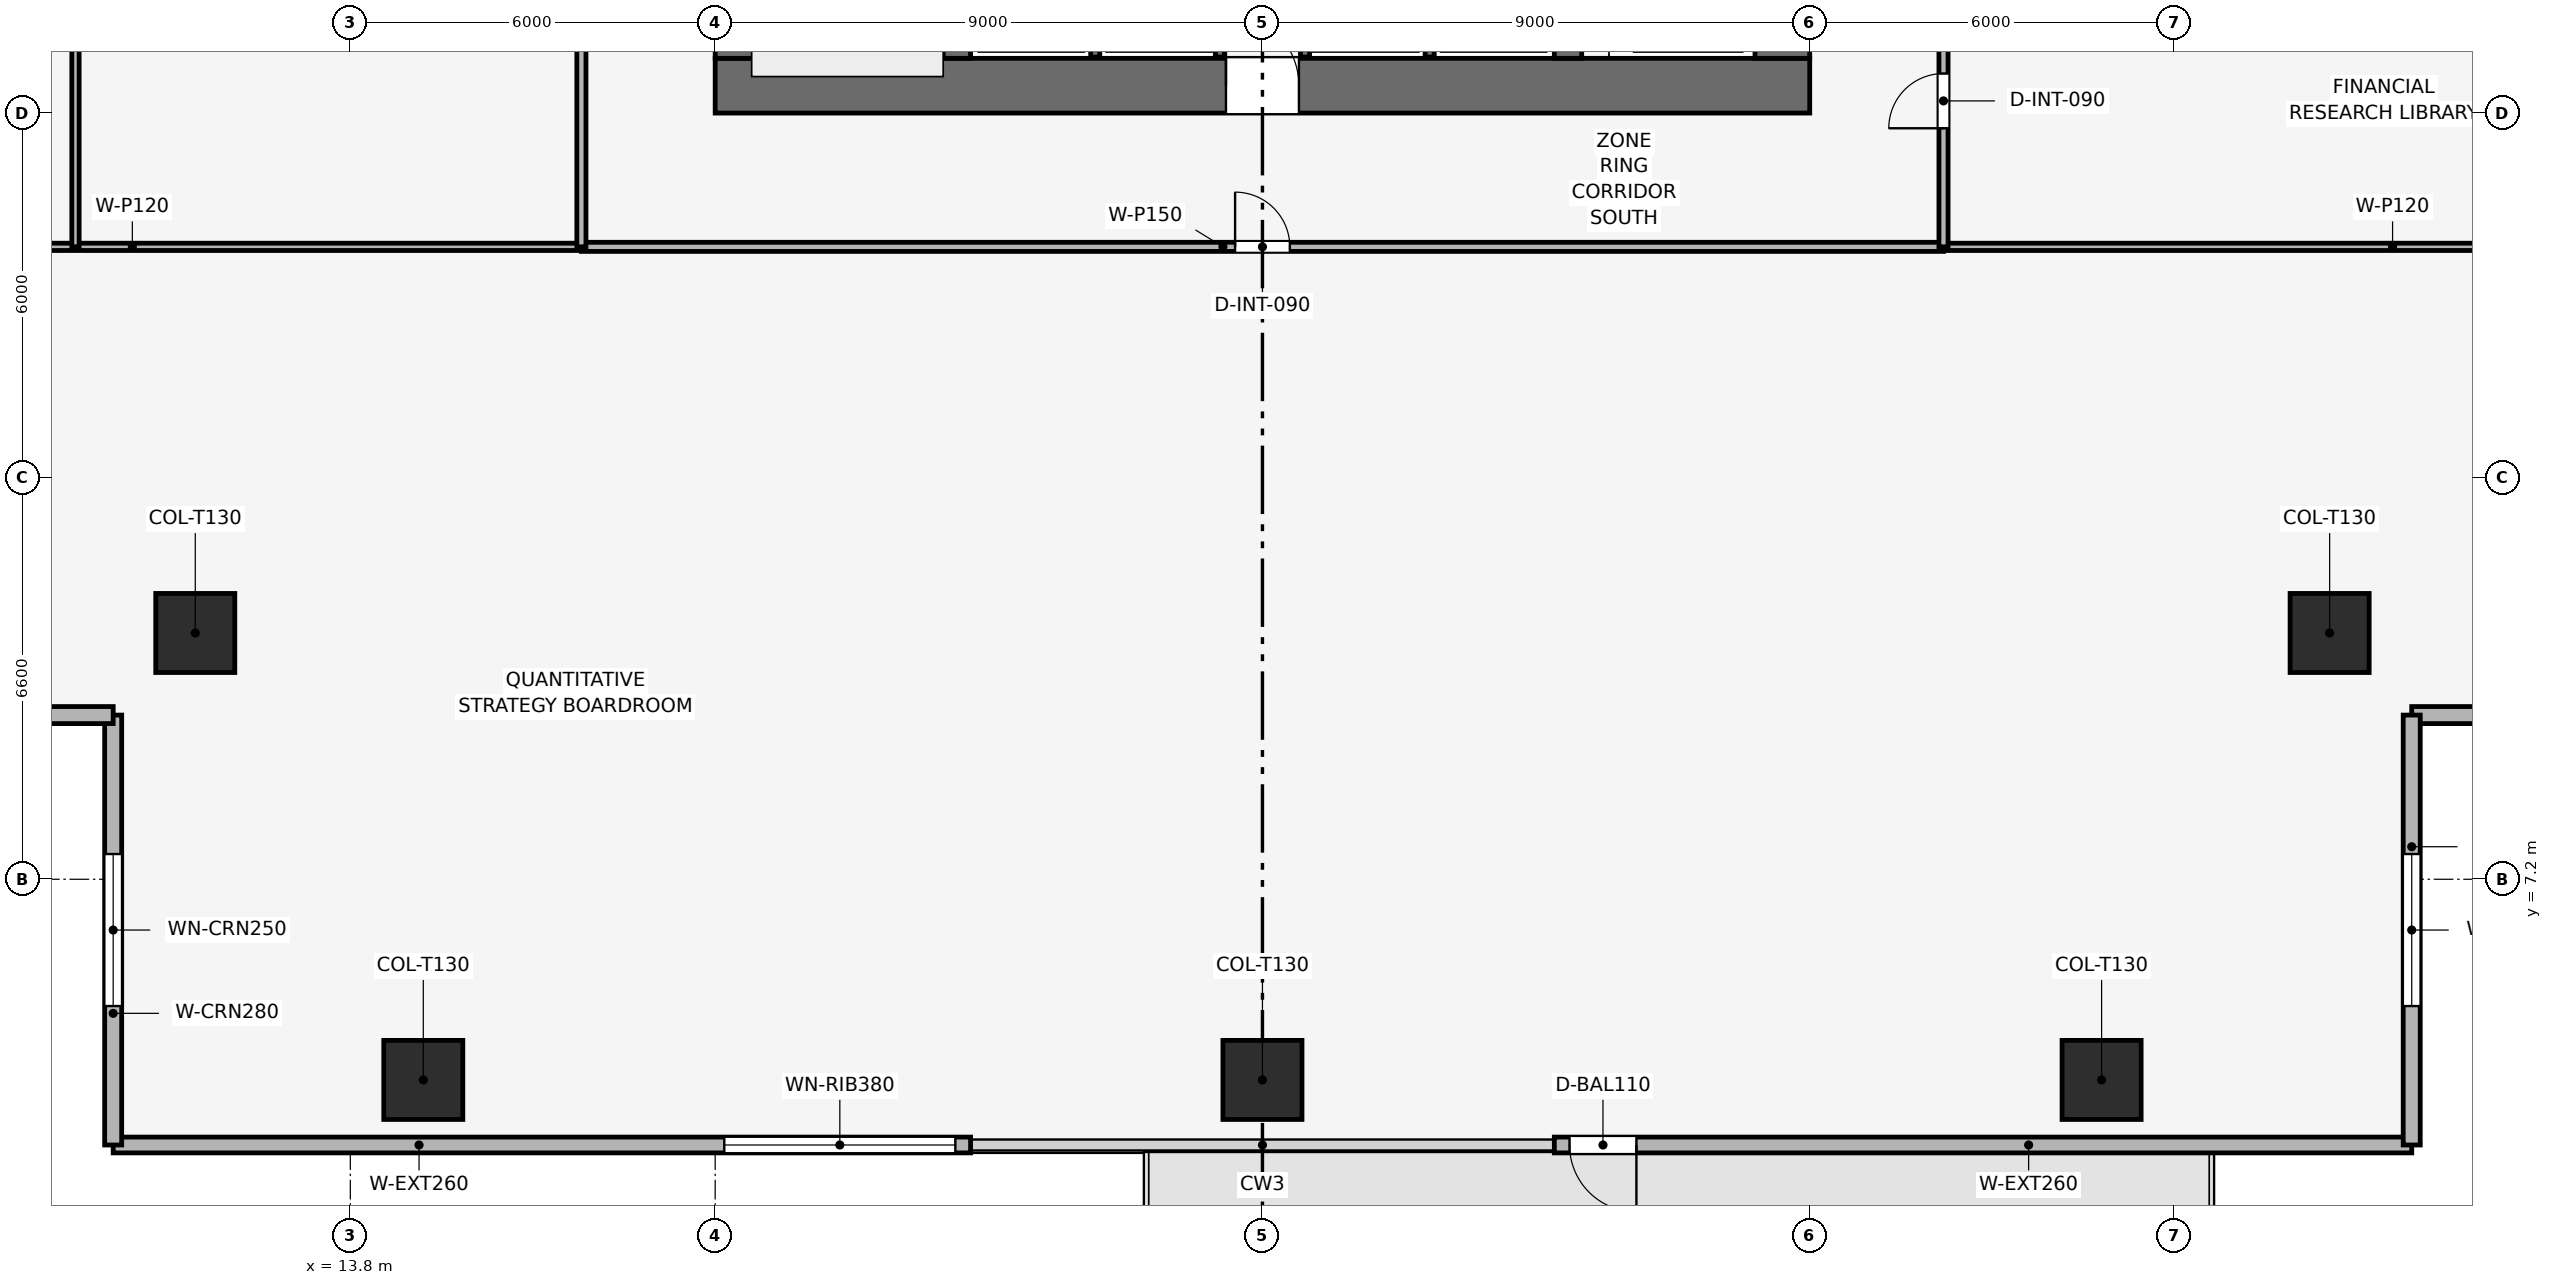
"""IFC4 building model, lengths in metres.
Left out: names, types, materials, properties, quantities, classifications, styles, units other than length and angle.
Written with IfcOpenShell. Run it as: python <this file> out.ifc"""

import sys

from ifc_helpers import new_model, si_unit, direction, frame, frame_2d, origin, origin_2d, place, context, subcontext, project, spatial, rectangle, extrude, element, fill, save


model = new_model("IFC4")
c1 = context("Model", 3, precision=1e-05, world=origin(), true_north=direction((0.0, 1.0)))
c2 = subcontext(c1, "Body", "Model", "MODEL_VIEW")
j1 = project(units=[si_unit("LENGTHUNIT", "METRE"), si_unit("PLANEANGLEUNIT", "RADIAN")], contexts=[c1])
p1 = place(None, origin())
s1 = spatial("IfcSite", under=j1, at=p1, CompositionType="ELEMENT")
p2 = place(p1, origin())
s2 = spatial("IfcBuilding", under=s1, at=p2, CompositionType="ELEMENT")
p3 = place(p2, frame((0.0, 0.0, 117.3)))
s3 = spatial("IfcBuildingStorey", under=s2, at=p3, CompositionType="ELEMENT", Elevation=117.3)
p4 = place(p3, frame((19.8, 20.25, 0.0), z_axis=(0.0, 0.0, 1.0), x_axis=(1.0, 0.0, 0.0)))
e1 = element("IfcWall", 1, at=p4, inside=s3, PredefinedType="SHEAR", context=c2, shape_type="SweptSolid", body=[
    extrude(rectangle(XDim=18.0, YDim=0.9, at=frame_2d((9.0, 0.0))), origin(), (0.0, 0.0, 1.0), 3.9),
])
p5 = place(p4, frame((8.4, 0.0, 0.0)))
e2 = element("IfcOpeningElement", 2, at=p5, cuts=e1, PredefinedType="OPENING", context=c2, shape_type="SweptSolid", body=[
    extrude(rectangle(XDim=1.2, YDim=2.2, at=frame_2d((0.6, 1.1))), frame((0.0, 0.46, 0.0), z_axis=(0.0, -1.0, 0.0), x_axis=(1.0, 0.0, 0.0)), (0.0, 0.0, 1.0), 0.92),
])
p6 = place(p3, frame((20.25, 20.7, 0.0), z_axis=(0.0, 0.0, 1.0), x_axis=(0.0, 1.0, 0.0)))
e3 = element("IfcWall", 3, at=p6, inside=s3, PredefinedType="SHEAR", context=c2, shape_type="SweptSolid", body=[
    extrude(rectangle(XDim=16.2, YDim=0.9, at=frame_2d((8.1, 0.0))), origin(), (0.0, 0.0, 1.0), 3.9),
])
p7 = place(p6, frame((10.1, 0.0, 0.0)))
e4 = element("IfcOpeningElement", 4, at=p7, cuts=e3, PredefinedType="OPENING", context=c2, shape_type="SweptSolid", body=[
    extrude(rectangle(XDim=1.1, YDim=2.15, at=frame_2d((0.55, 1.075))), frame((0.0, 0.46, 0.0), z_axis=(0.0, -1.0, 0.0), x_axis=(1.0, 0.0, 0.0)), (0.0, 0.0, 1.0), 0.92),
])
p8 = place(p3, frame((37.35, 20.7, 0.0), z_axis=(0.0, 0.0, 1.0), x_axis=(0.0, 1.0, 0.0)))
e5 = element("IfcWall", 5, at=p8, inside=s3, PredefinedType="SHEAR", context=c2, shape_type="SweptSolid", body=[
    extrude(rectangle(XDim=16.2, YDim=0.9, at=frame_2d((8.1, 0.0))), origin(), (0.0, 0.0, 1.0), 3.9),
])
p9 = place(p8, frame((4.6, 0.0, 0.0)))
e6 = element("IfcOpeningElement", 6, at=p9, cuts=e5, PredefinedType="OPENING", context=c2, shape_type="SweptSolid", body=[
    extrude(rectangle(XDim=1.1, YDim=2.15, at=frame_2d((0.55, 1.075))), frame((0.0, 0.46, 0.0), z_axis=(0.0, -1.0, 0.0), x_axis=(1.0, 0.0, 0.0)), (0.0, 0.0, 1.0), 0.92),
])
for number, where, z_axis, x_axis in (
    (7, (23.775, 20.7, 0.0), (0.0, 0.0, 1.0), (0.0, 1.0, 0.0)),
    (8, (33.825, 20.7, 0.0), (0.0, 0.0, 1.0), (0.0, 1.0, 0.0)),
):
    element("IfcWall", number, at=place(p3, frame(where, z_axis=z_axis, x_axis=x_axis)), inside=s3, PredefinedType="SHEAR", context=c2, shape_type="SweptSolid", body=[
        extrude(rectangle(XDim=16.2, YDim=0.45, at=frame_2d((8.1, 0.0))), origin(), (0.0, 0.0, 1.0), 3.9),
    ])
for number, where, z_axis, x_axis in (
    (9, (15.0, 3.9, 0.003), (0.0, 0.0, 1.0), (1.0, 0.0, 0.0)),
    (10, (28.8, 3.9, 0.003), (0.0, 0.0, 1.0), (1.0, 0.0, 0.0)),
    (11, (42.6, 3.9, 0.003), (0.0, 0.0, 1.0), (1.0, 0.0, 0.0)),
    (12, (11.25, 11.25, 0.003), (0.0, 0.0, 1.0), (1.0, 0.0, 0.0)),
    (13, (46.35, 11.25, 0.003), (0.0, 0.0, 1.0), (1.0, 0.0, 0.0)),
):
    element("IfcColumn", number, at=place(p3, frame(where, z_axis=z_axis, x_axis=x_axis)), inside=s3, PredefinedType="COLUMN", context=c2, shape_type="SweptSolid", body=[
        extrude(rectangle(XDim=1.3, YDim=1.3, at=origin_2d()), origin(), (0.0, 0.0, 1.0), 3.644),
    ])
p10 = place(p3, frame((47.7, 2.83, 0.0), z_axis=(0.0, 0.0, 1.0), x_axis=(-1.0, 0.0, 0.0)))
e14 = element("IfcWall", 14, at=p10, inside=s3, PredefinedType="SOLIDWALL", context=c2, shape_type="SweptSolid", body=[
    extrude(rectangle(XDim=14.1, YDim=0.26, at=frame_2d((7.05, 0.0))), origin(), (0.0, 0.0, 1.0), 3.65),
])
p11 = place(p10, frame((12.75, 0.0, 0.0)))
e15 = element("IfcOpeningElement", 15, at=p11, cuts=e14, PredefinedType="OPENING", context=c2, shape_type="SweptSolid", body=[
    extrude(rectangle(XDim=1.1, YDim=2.2, at=frame_2d((0.55, 1.1))), frame((0.0, 0.14, 0.0), z_axis=(0.0, -1.0, 0.0), x_axis=(1.0, 0.0, 0.0)), (0.0, 0.0, 1.0), 0.28),
])
p12 = place(p3, frame((24.0, 2.83, 0.0), z_axis=(0.0, 0.0, 1.0), x_axis=(-1.0, 0.0, 0.0)))
e16 = element("IfcWall", 16, at=p12, inside=s3, PredefinedType="SOLIDWALL", context=c2, shape_type="SweptSolid", body=[
    extrude(rectangle(XDim=14.1, YDim=0.26, at=frame_2d((7.05, 0.0))), origin(), (0.0, 0.0, 1.0), 3.65),
])
p13 = place(p12, frame((0.25, 0.0, 0.9)))
e17 = element("IfcOpeningElement", 17, at=p13, cuts=e16, PredefinedType="OPENING", context=c2, shape_type="SweptSolid", body=[
    extrude(rectangle(XDim=3.8, YDim=1.9, at=frame_2d((1.9, 0.95))), frame((0.0, 0.14, 0.0), z_axis=(0.0, -1.0, 0.0), x_axis=(1.0, 0.0, 0.0)), (0.0, 0.0, 1.0), 0.28),
])
p14 = place(p3, frame((9.9, 2.83, 0.0), z_axis=(0.0, 0.0, 1.0), x_axis=(0.0, 1.0, 0.0)))
e18 = element("IfcWall", 18, at=p14, inside=s3, PredefinedType="SOLIDWALL", context=c2, shape_type="SweptSolid", body=[
    extrude(rectangle(XDim=7.07, YDim=0.28, at=frame_2d((3.535, 0.0))), origin(), (0.0, 0.0, 1.0), 3.65),
])
p15 = place(p14, frame((2.285, 0.0, 0.9)))
e19 = element("IfcOpeningElement", 19, at=p15, cuts=e18, PredefinedType="OPENING", context=c2, shape_type="SweptSolid", body=[
    extrude(rectangle(XDim=2.5, YDim=1.9, at=frame_2d((1.25, 0.95))), frame((0.0, 0.15, 0.0), z_axis=(0.0, -1.0, 0.0), x_axis=(1.0, 0.0, 0.0)), (0.0, 0.0, 1.0), 0.3),
])
p16 = place(p3, frame((9.9, 9.9, 0.0), z_axis=(0.0, 0.0, 1.0), x_axis=(-1.0, 0.0, 0.0)))
e20 = element("IfcWall", 20, at=p16, inside=s3, PredefinedType="SOLIDWALL", context=c2, shape_type="SweptSolid", body=[
    extrude(rectangle(XDim=7.07, YDim=0.28, at=frame_2d((3.535, 0.0))), origin(), (0.0, 0.0, 1.0), 3.65),
])
p17 = place(p16, frame((2.285, 0.0, 0.9)))
e21 = element("IfcOpeningElement", 21, at=p17, cuts=e20, PredefinedType="OPENING", context=c2, shape_type="SweptSolid", body=[
    extrude(rectangle(XDim=2.5, YDim=1.9, at=frame_2d((1.25, 0.95))), frame((0.0, 0.15, 0.0), z_axis=(0.0, -1.0, 0.0), x_axis=(1.0, 0.0, 0.0)), (0.0, 0.0, 1.0), 0.3),
])
p18 = place(p3, frame((54.77, 9.9, 0.0), z_axis=(0.0, 0.0, 1.0), x_axis=(-1.0, 0.0, 0.0)))
e22 = element("IfcWall", 22, at=p18, inside=s3, PredefinedType="SOLIDWALL", context=c2, shape_type="SweptSolid", body=[
    extrude(rectangle(XDim=7.07, YDim=0.28, at=frame_2d((3.535, 0.0))), origin(), (0.0, 0.0, 1.0), 3.65),
])
p19 = place(p18, frame((2.285, 0.0, 0.9)))
e23 = element("IfcOpeningElement", 23, at=p19, cuts=e22, PredefinedType="OPENING", context=c2, shape_type="SweptSolid", body=[
    extrude(rectangle(XDim=2.5, YDim=1.9, at=frame_2d((1.25, 0.95))), frame((0.0, 0.15, 0.0), z_axis=(0.0, -1.0, 0.0), x_axis=(1.0, 0.0, 0.0)), (0.0, 0.0, 1.0), 0.3),
])
p20 = place(p3, frame((47.7, 9.9, 0.0), z_axis=(0.0, 0.0, 1.0), x_axis=(0.0, -1.0, 0.0)))
e24 = element("IfcWall", 24, at=p20, inside=s3, PredefinedType="SOLIDWALL", context=c2, shape_type="SweptSolid", body=[
    extrude(rectangle(XDim=7.07, YDim=0.28, at=frame_2d((3.535, 0.0))), origin(), (0.0, 0.0, 1.0), 3.65),
])
p21 = place(p20, frame((2.285, 0.0, 0.9)))
e25 = element("IfcOpeningElement", 25, at=p21, cuts=e24, PredefinedType="OPENING", context=c2, shape_type="SweptSolid", body=[
    extrude(rectangle(XDim=2.5, YDim=1.9, at=frame_2d((1.25, 0.95))), frame((0.0, 0.15, 0.0), z_axis=(0.0, -1.0, 0.0), x_axis=(1.0, 0.0, 0.0)), (0.0, 0.0, 1.0), 0.3),
])
for number, where, z_axis, x_axis in (
    (26, (26.05, 20.72, 0.0), (0.0, 0.0, 1.0), (0.0, 1.0, 0.0)),
    (27, (28.1, 20.72, 0.0), (0.0, 0.0, 1.0), (0.0, 1.0, 0.0)),
    (28, (29.5, 20.72, 0.0), (0.0, 0.0, 1.0), (0.0, 1.0, 0.0)),
    (29, (31.55, 20.72, 0.0), (0.0, 0.0, 1.0), (0.0, 1.0, 0.0)),
):
    element("IfcWall", number, at=place(p3, frame(where, z_axis=z_axis, x_axis=x_axis)), inside=s3, PredefinedType="SHEAR", context=c2, shape_type="SweptSolid", body=[
        extrude(rectangle(XDim=2.26, YDim=0.15, at=frame_2d((1.13, 0.0))), origin(), (0.0, 0.0, 1.0), 3.65),
    ])
for number, where, z_axis, x_axis in (
    (30, (2.83, 17.6, 0.0), (0.0, 0.0, 1.0), (1.0, 0.0, 0.0)),
    (31, (40.0, 17.6, 0.0), (0.0, 0.0, 1.0), (1.0, 0.0, 0.0)),
):
    element("IfcWall", number, at=place(p3, frame(where, z_axis=z_axis, x_axis=x_axis)), inside=s3, PredefinedType="PARTITIONING", context=c2, shape_type="SweptSolid", body=[
        extrude(rectangle(XDim=14.77, YDim=0.12, at=frame_2d((7.385, 0.0))), origin(), (0.0, 0.0, 1.0), 3.035),
    ])
p22 = place(p3, frame((9.28, 17.6, 0.0), z_axis=(0.0, 0.0, 1.0), x_axis=(0.0, 1.0, 0.0)))
e32 = element("IfcWall", 32, at=p22, inside=s3, PredefinedType="PARTITIONING", context=c2, shape_type="SweptSolid", body=[
    extrude(rectangle(XDim=22.4, YDim=0.12, at=frame_2d((11.2, 0.0))), origin(), (0.0, 0.0, 1.0), 3.185),
])
p23 = place(p22, frame((17.783, 0.0, 0.0)))
e33 = element("IfcOpeningElement", 33, at=p23, cuts=e32, PredefinedType="OPENING", context=c2, shape_type="SweptSolid", body=[
    extrude(rectangle(XDim=0.9, YDim=2.1, at=frame_2d((0.45, 1.05))), frame((0.0, 0.07, 0.0), z_axis=(0.0, -1.0, 0.0), x_axis=(1.0, 0.0, 0.0)), (0.0, 0.0, 1.0), 0.14),
])
p24 = place(p3, frame((17.6, 17.6, 0.0), z_axis=(0.0, 0.0, 1.0), x_axis=(1.0, 0.0, 0.0)))
e34 = element("IfcWall", 34, at=p24, inside=s3, PredefinedType="PARTITIONING", context=c2, shape_type="SweptSolid", body=[
    extrude(rectangle(XDim=22.4, YDim=0.15, at=frame_2d((11.2, 0.0))), origin(), (0.0, 0.0, 1.0), 3.185),
])
p25 = place(p24, frame((10.75, 0.0, 0.0)))
e35 = element("IfcOpeningElement", 35, at=p25, cuts=e34, PredefinedType="OPENING", context=c2, shape_type="SweptSolid", body=[
    extrude(rectangle(XDim=0.9, YDim=2.1, at=frame_2d((0.45, 1.05))), frame((0.0, 0.085, 0.0), z_axis=(0.0, -1.0, 0.0), x_axis=(1.0, 0.0, 0.0)), (0.0, 0.0, 1.0), 0.17),
])
p26 = place(p3, frame((17.6, 17.6, 0.0), z_axis=(0.0, 0.0, 1.0), x_axis=(0.0, 1.0, 0.0)))
e36 = element("IfcWall", 36, at=p26, inside=s3, PredefinedType="PARTITIONING", context=c2, shape_type="SweptSolid", body=[
    extrude(rectangle(XDim=22.4, YDim=0.15, at=frame_2d((11.2, 0.0))), origin(), (0.0, 0.0, 1.0), 3.185),
])
p27 = place(p26, frame((10.75, 0.0, 0.0)))
e37 = element("IfcOpeningElement", 37, at=p27, cuts=e36, PredefinedType="OPENING", context=c2, shape_type="SweptSolid", body=[
    extrude(rectangle(XDim=0.9, YDim=2.1, at=frame_2d((0.45, 1.05))), frame((0.0, 0.085, 0.0), z_axis=(0.0, -1.0, 0.0), x_axis=(1.0, 0.0, 0.0)), (0.0, 0.0, 1.0), 0.17),
])
p28 = place(p3, frame((40.0, 17.6, 0.0), z_axis=(0.0, 0.0, 1.0), x_axis=(0.0, 1.0, 0.0)))
e38 = element("IfcWall", 38, at=p28, inside=s3, PredefinedType="PARTITIONING", context=c2, shape_type="SweptSolid", body=[
    extrude(rectangle(XDim=22.4, YDim=0.15, at=frame_2d((11.2, 0.0))), origin(), (0.0, 0.0, 1.0), 3.185),
])
p29 = place(p28, frame((1.95, 0.0, 0.0)))
e39 = element("IfcOpeningElement", 39, at=p29, cuts=e38, PredefinedType="OPENING", context=c2, shape_type="SweptSolid", body=[
    extrude(rectangle(XDim=0.9, YDim=2.1, at=frame_2d((0.45, 1.05))), frame((0.0, 0.085, 0.0), z_axis=(0.0, -1.0, 0.0), x_axis=(1.0, 0.0, 0.0)), (0.0, 0.0, 1.0), 0.17),
])
p30 = place(p28, frame((5.75, 0.0, 0.0)))
e40 = element("IfcOpeningElement", 40, at=p30, cuts=e38, PredefinedType="OPENING", context=c2, shape_type="SweptSolid", body=[
    extrude(rectangle(XDim=0.9, YDim=2.1, at=frame_2d((0.45, 1.05))), frame((0.0, 0.085, 0.0), z_axis=(0.0, -1.0, 0.0), x_axis=(1.0, 0.0, 0.0)), (0.0, 0.0, 1.0), 0.17),
])
p31 = place(p28, frame((8.65, 0.0, 0.0)))
e41 = element("IfcOpeningElement", 41, at=p31, cuts=e38, PredefinedType="OPENING", context=c2, shape_type="SweptSolid", body=[
    extrude(rectangle(XDim=0.9, YDim=2.1, at=frame_2d((0.45, 1.05))), frame((0.0, 0.085, 0.0), z_axis=(0.0, -1.0, 0.0), x_axis=(1.0, 0.0, 0.0)), (0.0, 0.0, 1.0), 0.17),
])
p32 = place(p28, frame((11.4, 0.0, 0.0)))
e42 = element("IfcOpeningElement", 42, at=p32, cuts=e38, PredefinedType="OPENING", context=c2, shape_type="SweptSolid", body=[
    extrude(rectangle(XDim=0.95, YDim=2.1, at=frame_2d((0.475, 1.05))), frame((0.0, 0.085, 0.0), z_axis=(0.0, -1.0, 0.0), x_axis=(1.0, 0.0, 0.0)), (0.0, 0.0, 1.0), 0.17),
])
p33 = place(p28, frame((17.35, 0.0, 0.0)))
e43 = element("IfcOpeningElement", 43, at=p33, cuts=e38, PredefinedType="OPENING", context=c2, shape_type="SweptSolid", body=[
    extrude(rectangle(XDim=0.9, YDim=2.1, at=frame_2d((0.45, 1.05))), frame((0.0, 0.085, 0.0), z_axis=(0.0, -1.0, 0.0), x_axis=(1.0, 0.0, 0.0)), (0.0, 0.0, 1.0), 0.17),
])
p34 = place(p11, origin())
e44 = element("IfcDoor", 44, at=p34, inside=s3, OperationType="SINGLE_SWING_LEFT", PredefinedType="DOOR", context=c2, shape_type="SweptSolid", body=[
    extrude(rectangle(XDim=1.1, YDim=2.2, at=frame_2d((0.55, 1.1))), frame((0.0, 0.025, 0.0), z_axis=(0.0, -1.0, 0.0), x_axis=(1.0, 0.0, 0.0)), (0.0, 0.0, 1.0), 0.05),
])
fill(e15, e44)
p35 = place(p13, origin())
e45 = element("IfcWindow", 45, at=p35, inside=s3, PartitioningType="SINGLE_PANEL", PredefinedType="WINDOW", context=c2, shape_type="SweptSolid", body=[
    extrude(rectangle(XDim=3.8, YDim=1.9, at=frame_2d((1.9, 0.95))), frame((0.0, 0.03, 0.0), z_axis=(0.0, -1.0, 0.0), x_axis=(1.0, 0.0, 0.0)), (0.0, 0.0, 1.0), 0.06),
])
fill(e17, e45)
p36 = place(p15, origin())
e46 = element("IfcWindow", 46, at=p36, inside=s3, PartitioningType="SINGLE_PANEL", PredefinedType="WINDOW", context=c2, shape_type="SweptSolid", body=[
    extrude(rectangle(XDim=2.5, YDim=1.9, at=frame_2d((1.25, 0.95))), frame((0.0, 0.03, 0.0), z_axis=(0.0, -1.0, 0.0), x_axis=(1.0, 0.0, 0.0)), (0.0, 0.0, 1.0), 0.06),
])
fill(e19, e46)
p37 = place(p21, origin())
e47 = element("IfcWindow", 47, at=p37, inside=s3, PartitioningType="SINGLE_PANEL", PredefinedType="WINDOW", context=c2, shape_type="SweptSolid", body=[
    extrude(rectangle(XDim=2.5, YDim=1.9, at=frame_2d((1.25, 0.95))), frame((0.0, 0.03, 0.0), z_axis=(0.0, -1.0, 0.0), x_axis=(1.0, 0.0, 0.0)), (0.0, 0.0, 1.0), 0.06),
])
fill(e25, e47)
p38 = place(p25, origin())
e48 = element("IfcDoor", 48, at=p38, inside=s3, OperationType="SINGLE_SWING_LEFT", PredefinedType="DOOR", context=c2, shape_type="SweptSolid", body=[
    extrude(rectangle(XDim=0.9, YDim=2.1, at=frame_2d((0.45, 1.05))), frame((0.0, 0.025, 0.0), z_axis=(0.0, -1.0, 0.0), x_axis=(1.0, 0.0, 0.0)), (0.0, 0.0, 1.0), 0.05),
])
fill(e35, e48)
p39 = place(p29, origin())
e49 = element("IfcDoor", 49, at=p39, inside=s3, OperationType="SINGLE_SWING_LEFT", PredefinedType="DOOR", context=c2, shape_type="SweptSolid", body=[
    extrude(rectangle(XDim=0.9, YDim=2.1, at=frame_2d((0.45, 1.05))), frame((0.0, 0.025, 0.0), z_axis=(0.0, -1.0, 0.0), x_axis=(1.0, 0.0, 0.0)), (0.0, 0.0, 1.0), 0.05),
])
fill(e39, e49)
p40 = place(p5, origin())
e50 = element("IfcDoor", 50, at=p40, inside=s3, OperationType="SINGLE_SWING_LEFT", PredefinedType="DOOR", context=c2, shape_type="SweptSolid", body=[
    extrude(rectangle(XDim=1.2, YDim=2.2, at=frame_2d((0.6, 1.1))), frame((0.0, 0.025, 0.0), z_axis=(0.0, -1.0, 0.0), x_axis=(1.0, 0.0, 0.0)), (0.0, 0.0, 1.0), 0.05),
])
fill(e2, e50)
save(model, sys.argv[1])
